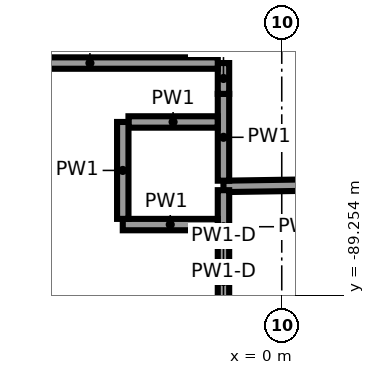
"""IFC4 building model, lengths in metres.
Left out: names, types, materials, properties, quantities, classifications, styles, units other than length and angle.
Written with IfcOpenShell. Run it as: python <this file> out.ifc"""

import sys

from ifc_helpers import new_model, si_unit, direction, frame, frame_2d, origin, place, context, subcontext, project, spatial, rectangle, extrude, element, save


model = new_model("IFC4")
c1 = context("Model", 3, precision=1e-05, world=origin(), true_north=direction((0.0, 1.0)))
c2 = subcontext(c1, "Body", "Model", "MODEL_VIEW")
j1 = project(units=[si_unit("LENGTHUNIT", "METRE"), si_unit("PLANEANGLEUNIT", "RADIAN")], contexts=[c1])
p1 = place(None, origin())
s1 = spatial("IfcSite", under=j1, at=p1, CompositionType="ELEMENT")
p2 = place(p1, origin())
s2 = spatial("IfcBuilding", under=s1, at=p2, CompositionType="ELEMENT")
p3 = place(p2, frame((0.0, 0.0, -4.0)))
s3 = spatial("IfcBuildingStorey", under=s2, at=p3, CompositionType="ELEMENT", Elevation=-4.0)
p4 = place(p3, frame((6.178, -87.716, 0.0), z_axis=(0.0, 0.0, 1.0), x_axis=(-0.999883104063, -0.01528980737, 0.0)))
e1 = element("IfcWall", 1, at=p4, inside=s3, PredefinedType="PARTITIONING", context=c2, shape_type="SweptSolid", body=[
    extrude(rectangle(XDim=6.946, YDim=0.15, at=frame_2d((3.473, 0.0))), origin(), (0.0, 0.0, 1.0), 3.6),
])
p5 = place(p3, frame((-0.767, -87.748, 0.0), z_axis=(0.0, 0.0, 1.0), x_axis=(0.0, 1.0, 0.0)))
e2 = element("IfcWall", 2, at=p5, inside=s3, PredefinedType="PARTITIONING", context=c2, shape_type="SweptSolid", body=[
    extrude(rectangle(XDim=1.142, YDim=0.15, at=frame_2d((0.571, 0.0))), origin(), (0.0, 0.0, 1.0), 3.6),
])
p6 = place(p3, frame((-0.767, -86.606, 0.0), z_axis=(0.0, 0.0, 1.0), x_axis=(0.0, 1.0, 0.0)))
e3 = element("IfcWall", 3, at=p6, inside=s3, PredefinedType="PARTITIONING", context=c2, shape_type="SweptSolid", body=[
    extrude(rectangle(XDim=0.406, YDim=0.15, at=frame_2d((0.203, 0.0))), origin(), (0.0, 0.0, 1.0), 2.3),
])
p7 = place(p3, frame((-0.842, -86.2, 0.0), z_axis=(0.0, 0.0, 1.0), x_axis=(-1.0, 0.0, 0.0)))
e4 = element("IfcWall", 4, at=p7, inside=s3, PredefinedType="PARTITIONING", context=c2, shape_type="SweptSolid", body=[
    extrude(rectangle(XDim=3.364, YDim=0.15, at=frame_2d((1.682, 0.0))), origin(), (0.0, 0.0, 1.0), 2.3),
])
p8 = place(p3, frame((-0.767, -89.315, 0.0), z_axis=(0.0, 0.0, 1.0), x_axis=(0.0, 1.0, 0.0)))
e5 = element("IfcWall", 5, at=p8, inside=s3, PredefinedType="PARTITIONING", context=c2, shape_type="SweptSolid", body=[
    extrude(rectangle(XDim=0.481, YDim=0.15, at=frame_2d((0.24, 0.0))), origin(), (0.0, 0.0, 1.0), 2.3),
])
p9 = place(p3, frame((-0.767, -88.834, 0.0), z_axis=(0.0, 0.0, 1.0), x_axis=(0.0, 1.0, 0.0)))
e6 = element("IfcWall", 6, at=p9, inside=s3, PredefinedType="PARTITIONING", context=c2, shape_type="SweptSolid", body=[
    extrude(rectangle(XDim=0.961, YDim=0.15, at=frame_2d((0.481, 0.0))), origin(), (0.0, 0.0, 1.0), 3.6),
])
p10 = place(p3, frame((-2.092, -88.325, 0.0), z_axis=(0.0, 0.0, 1.0), x_axis=(1.0, 0.0, 0.0)))
e7 = element("IfcWall", 7, at=p10, inside=s3, PredefinedType="PARTITIONING", context=c2, shape_type="SweptSolid", body=[
    extrude(rectangle(XDim=1.249, YDim=0.15, at=frame_2d((0.625, 0.0))), origin(), (0.0, 0.0, 1.0), 3.6),
])
p11 = place(p3, frame((-0.843, -86.975, 0.0), z_axis=(0.0, 0.0, 1.0), x_axis=(-1.0, 0.0, 0.0)))
e8 = element("IfcWall", 8, at=p11, inside=s3, PredefinedType="PARTITIONING", context=c2, shape_type="SweptSolid", body=[
    extrude(rectangle(XDim=1.174, YDim=0.15, at=frame_2d((0.587, 0.0))), origin(), (0.0, 0.0, 1.0), 3.6),
])
p12 = place(p3, frame((-2.092, -86.975, 0.0), z_axis=(0.0, 0.0, 1.0), x_axis=(0.0, -1.0, 0.0)))
e9 = element("IfcWall", 9, at=p12, inside=s3, PredefinedType="PARTITIONING", context=c2, shape_type="SweptSolid", body=[
    extrude(rectangle(XDim=1.275, YDim=0.15, at=frame_2d((0.637, 0.0))), origin(), (0.0, 0.0, 1.0), 3.6),
])
save(model, sys.argv[1])
